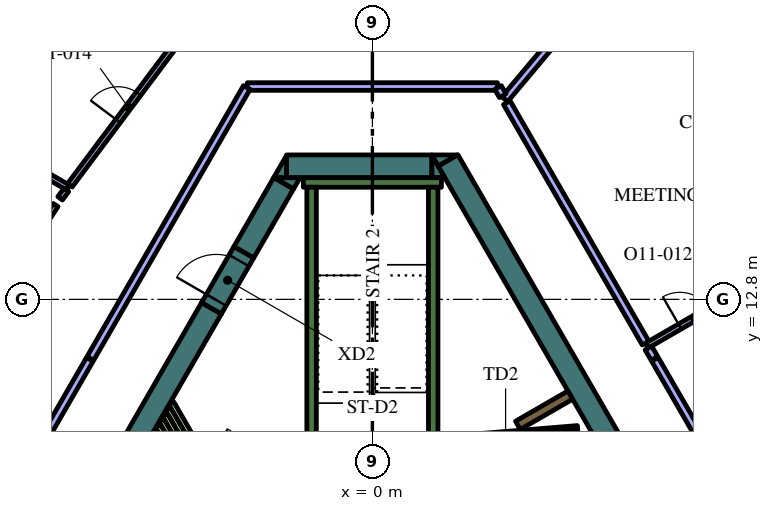
"""IFC4 building model, lengths in metres.
Left out: names, types, materials, properties, quantities, classifications, styles, units other than length and angle.
Written with IfcOpenShell. Run it as: python <this file> out.ifc"""

import sys

from ifc_helpers import new_model, si_unit, direction, frame, frame_2d, origin, place, context, subcontext, project, spatial, polyline, rectangle, outline, extrude, element, fill, save


model = new_model("IFC4")
c1 = context("Model", 3, precision=1e-05, world=origin(), true_north=direction((0.0, 1.0)))
c2 = subcontext(c1, "Body", "Model", "MODEL_VIEW")
j1 = project(units=[si_unit("LENGTHUNIT", "METRE"), si_unit("PLANEANGLEUNIT", "RADIAN")], contexts=[c1])
p1 = place(None, origin())
s1 = spatial("IfcSite", under=j1, at=p1, CompositionType="ELEMENT")
p2 = place(p1, origin())
s2 = spatial("IfcBuilding", under=s1, at=p2, CompositionType="ELEMENT")
p3 = place(p2, frame((0.0, 0.0, 271.2)))
s3 = spatial("IfcBuildingStorey", under=s2, at=p3, CompositionType="ELEMENT", Elevation=271.2)
p4 = place(p3, frame((1.989, 16.456, 0.0), z_axis=(0.0, 0.0, 1.0), x_axis=(0.49999102663, -0.8660305845, 0.0)))
e1 = element("IfcWall", 1, at=p4, inside=s3, PredefinedType="SOLIDWALL", context=c2, shape_type="SweptSolid", body=[
    extrude(rectangle(XDim=12.406, YDim=0.6, at=frame_2d((6.203, 0.0))), origin(), (0.0, 0.0, 1.0), 4.2),
])
p5 = place(p3, origin())
e2 = element("IfcWall", 2, at=p5, inside=s3, PredefinedType="SOLIDWALL", context=c2, shape_type="SweptSolid", body=[
    extrude(outline(polyline([(1.559, 16.6), (2.235, 16.6), (1.728, 16.307), (1.559, 16.6)])), origin(), (0.0, 0.0, 1.0), 4.2),
])
p6 = place(p3, frame((-2.258, 16.3, 0.0), z_axis=(0.0, 0.0, 1.0), x_axis=(1.0, 0.0, 0.0)))
e3 = element("IfcWall", 3, at=p6, inside=s3, PredefinedType="SOLIDWALL", context=c2, shape_type="SweptSolid", body=[
    extrude(rectangle(XDim=3.823, YDim=0.6, at=frame_2d((1.912, 0.0))), origin(), (0.0, 0.0, 1.0), 4.2),
])
e4 = element("IfcWall", 4, at=p5, inside=s3, PredefinedType="SOLIDWALL", context=c2, shape_type="SweptSolid", body=[
    extrude(outline(polyline([(1.905, 16.0), (1.567, 16.0), (1.567, 16.585), (1.905, 16.0)])), origin(), (0.0, 0.0, 1.0), 4.2),
])
e5 = element("IfcWall", 5, at=p5, inside=s3, PredefinedType="SOLIDWALL", context=c2, shape_type="SweptSolid", body=[
    extrude(outline(polyline([(-2.598, 16.0), (-2.26, 16.585), (-2.26, 16.0), (-2.598, 16.0)])), origin(), (0.0, 0.0, 1.0), 4.2),
])
p7 = place(p3, frame((-2.335, 15.855, 0.0), z_axis=(0.0, 0.0, 1.0), x_axis=(-0.499980971027, -0.866036389889, 0.0)))
e6 = element("IfcWall", 6, at=p7, inside=s3, PredefinedType="SOLIDWALL", context=c2, shape_type="SweptSolid", body=[
    extrude(rectangle(XDim=2.098, YDim=0.6, at=frame_2d((1.049, 0.0))), origin(), (0.0, 0.0, 1.0), 4.2),
])
e7 = element("IfcWall", 7, at=p5, inside=s3, PredefinedType="SOLIDWALL", context=c2, shape_type="SweptSolid", body=[
    extrude(outline(polyline([(-1.905, 16.0), (-2.074, 15.707), (-2.581, 16.0), (-1.905, 16.0)])), origin(), (0.0, 0.0, 1.0), 4.2),
])
p8 = place(p3, frame((-4.234, 12.566, 0.0), z_axis=(0.0, 0.0, 1.0), x_axis=(-0.499998841866, -0.866026072432, 0.0)))
e8 = element("IfcWall", 8, at=p8, inside=s3, PredefinedType="SOLIDWALL", context=c2, shape_type="SweptSolid", body=[
    extrude(rectangle(XDim=16.694, YDim=0.6, at=frame_2d((8.347, 0.0))), origin(), (0.0, 0.0, 1.0), 4.2),
])
p9 = place(p3, frame((-1.817, 15.875, 0.0), z_axis=(0.0, 0.0, 1.0), x_axis=(1.0, 0.0, 0.0)))
e9 = element("IfcWall", 9, at=p9, inside=s3, PredefinedType="SOLIDWALL", context=c2, shape_type="SweptSolid", body=[
    extrude(rectangle(XDim=3.634, YDim=0.25, at=frame_2d((1.817, 0.0))), origin(), (0.0, 0.0, 1.0), 4.2),
])
p10 = place(p3, frame((1.6, 8.95, 0.0), z_axis=(0.0, 0.0, 1.0), x_axis=(0.0, 1.0, 0.0)))
e10 = element("IfcWall", 10, at=p10, inside=s3, PredefinedType="SOLIDWALL", context=c2, shape_type="SweptSolid", body=[
    extrude(rectangle(XDim=6.8, YDim=0.25, at=frame_2d((3.4, 0.0))), origin(), (0.0, 0.0, 1.0), 4.2),
])
p11 = place(p3, frame((-1.6, 8.7, 0.0), z_axis=(0.0, 0.0, 1.0), x_axis=(0.0, 1.0, 0.0)))
e11 = element("IfcWall", 11, at=p11, inside=s3, PredefinedType="SOLIDWALL", context=c2, shape_type="SweptSolid", body=[
    extrude(rectangle(XDim=7.05, YDim=0.25, at=frame_2d((3.525, 0.0))), origin(), (0.0, 0.0, 1.0), 4.2),
])
p12 = place(p3, frame((3.83, 9.486, 0.0), z_axis=(0.0, 0.0, 1.0), x_axis=(0.865986202621, 0.500067892261, 0.0)))
e12 = element("IfcWall", 12, at=p12, inside=s3, PredefinedType="SOLIDWALL", context=c2, shape_type="SweptSolid", body=[
    extrude(rectangle(XDim=1.591, YDim=0.25, at=frame_2d((0.795, 0.0))), origin(), (0.0, 0.0, 1.0), 4.2),
])
p13 = place(p3, frame((-5.294, 10.067, 0.0), z_axis=(0.0, 0.0, 1.0), x_axis=(0.500054140411, -0.865994143547, 0.0)))
e13 = element("IfcWall", 13, at=p13, inside=s3, PredefinedType="PARTITIONING", context=c2, shape_type="SweptSolid", body=[
    extrude(rectangle(XDim=1.529, YDim=0.15, at=frame_2d((0.765, 0.0))), origin(), (0.0, 0.0, 1.0), 3.55),
])
p14 = place(p3, frame((-5.381, 9.917, 0.0), z_axis=(0.0, 0.0, 1.0), x_axis=(0.500136970483, -0.865946309396, 0.0)))
e14 = element("IfcWall", 14, at=p14, inside=s3, PredefinedType="PARTITIONING", context=c2, shape_type="SweptSolid", body=[
    extrude(rectangle(XDim=1.359, YDim=0.15, at=frame_2d((0.68, 0.0))), origin(), (0.0, 0.0, 1.0), 3.55),
])
p15 = place(p3, frame((-5.467, 9.767, 0.0), z_axis=(0.0, 0.0, 1.0), x_axis=(0.500168849293, -0.86592789665, 0.0)))
e15 = element("IfcWall", 15, at=p15, inside=s3, PredefinedType="PARTITIONING", context=c2, shape_type="SweptSolid", body=[
    extrude(rectangle(XDim=1.01, YDim=0.15, at=frame_2d((0.505, 0.0))), origin(), (0.0, 0.0, 1.0), 3.55),
])
p16 = place(p3, frame((-5.554, 9.617, 0.0), z_axis=(0.0, 0.0, 1.0), x_axis=(0.500253084543, -0.86587923604, 0.0)))
e16 = element("IfcWall", 16, at=p16, inside=s3, PredefinedType="PARTITIONING", context=c2, shape_type="SweptSolid", body=[
    extrude(rectangle(XDim=0.664, YDim=0.15, at=frame_2d((0.332, 0.0))), origin(), (0.0, 0.0, 1.0), 3.55),
])
p17 = place(p3, frame((-5.64, 9.467, 0.0), z_axis=(0.0, 0.0, 1.0), x_axis=(0.499944387978, -0.86605750902, 0.0)))
e17 = element("IfcWall", 17, at=p17, inside=s3, PredefinedType="PARTITIONING", context=c2, shape_type="SweptSolid", body=[
    extrude(rectangle(XDim=0.317, YDim=0.15, at=frame_2d((0.159, 0.0))), origin(), (0.0, 0.0, 1.0), 3.55),
])
p18 = place(p3, frame((5.398, 9.419, 0.0), z_axis=(0.0, 0.0, 1.0), x_axis=(-0.996653416376, -0.081743303248, 0.0)))
e18 = element("IfcWall", 18, at=p18, inside=s3, PredefinedType="PARTITIONING", context=c2, shape_type="SweptSolid", body=[
    extrude(rectangle(XDim=2.7, YDim=0.12, at=frame_2d((1.35, 0.0))), origin(), (0.0, 0.0, 1.0), 3.55),
])
p19 = place(p18, frame((1.45, 0.0, 0.0)))
e19 = element("IfcOpeningElement", 19, at=p19, cuts=e18, PredefinedType="OPENING", context=c2, shape_type="SweptSolid", body=[
    extrude(rectangle(XDim=0.9, YDim=2.1, at=frame_2d((0.45, 1.05))), frame((0.0, 0.07, 0.0), z_axis=(0.0, -1.0, 0.0), x_axis=(1.0, 0.0, 0.0)), (0.0, 0.0, 1.0), 0.14),
])
p20 = place(p3, frame((-4.234, 12.566, 0.0), z_axis=(0.0, 0.0, 1.0), x_axis=(0.500000056704, 0.866025371046, 0.0)))
e20 = element("IfcWall", 20, at=p20, inside=s3, PredefinedType="SOLIDWALL", context=c2, shape_type="SweptSolid", body=[
    extrude(rectangle(XDim=1.7, YDim=0.6, at=frame_2d((0.85, 0.0))), origin(), (0.0, 0.0, 1.0), 4.2),
])
p21 = place(p20, frame((0.25, 0.0, 0.0)))
e21 = element("IfcOpeningElement", 21, at=p21, cuts=e20, PredefinedType="OPENING", context=c2, shape_type="SweptSolid", body=[
    extrude(rectangle(XDim=1.2, YDim=2.1, at=frame_2d((0.6, 1.05))), frame((0.0, 0.31, 0.0), z_axis=(0.0, -1.0, 0.0), x_axis=(1.0, 0.0, 0.0)), (0.0, 0.0, 1.0), 0.62),
])
p22 = place(p3, frame((7.226, 11.585, 0.0), z_axis=(0.0, 0.0, 1.0), x_axis=(0.866021079084, 0.500007490527, 0.0)))
e22 = element("IfcWall", 22, at=p22, inside=s3, PredefinedType="PARTITIONING", context=c2, shape_type="SweptSolid", body=[
    extrude(rectangle(XDim=2.892, YDim=0.15, at=frame_2d((1.446, 0.0))), origin(), (0.0, 0.0, 1.0), 3.55),
])
p23 = place(p22, frame((1.0, 0.0, 0.0)))
e23 = element("IfcOpeningElement", 23, at=p23, cuts=e22, PredefinedType="OPENING", context=c2, shape_type="SweptSolid", body=[
    extrude(rectangle(XDim=0.9, YDim=2.1, at=frame_2d((0.45, 1.05))), frame((0.0, 0.085, 0.0), z_axis=(0.0, -1.0, 0.0), x_axis=(1.0, 0.0, 0.0)), (0.0, 0.0, 1.0), 0.17),
])
p24 = place(p3, frame((13.436, 0.829, 0.0), z_axis=(0.0, 0.0, 1.0), x_axis=(-0.49999894854, 0.866026010844, 0.0)))
e24 = element("IfcWall", 24, at=p24, inside=s3, PredefinedType="PARTITIONING", context=c2, shape_type="SweptSolid", body=[
    extrude(rectangle(XDim=12.0, YDim=0.2, at=frame_2d((6.0, 0.0))), origin(), (0.0, 0.0, 1.0), 3.55),
])
p25 = place(p24, frame((5.5, 0.0, 0.0)))
e25 = element("IfcOpeningElement", 25, at=p25, cuts=e24, PredefinedType="OPENING", context=c2, shape_type="SweptSolid", body=[
    extrude(rectangle(XDim=1.0, YDim=2.1, at=frame_2d((0.5, 1.05))), frame((0.0, 0.11, 0.0), z_axis=(0.0, -1.0, 0.0), x_axis=(1.0, 0.0, 0.0)), (0.0, 0.0, 1.0), 0.22),
])
p26 = place(p3, frame((7.421, 11.247, 0.0), z_axis=(0.0, 0.0, 1.0), x_axis=(-0.500303403544, 0.865850162789, 0.0)))
e26 = element("IfcWall", 26, at=p26, inside=s3, PredefinedType="PARTITIONING", context=c2, shape_type="SweptSolid", body=[
    extrude(rectangle(XDim=0.315, YDim=0.2, at=frame_2d((0.158, 0.0))), origin(), (0.0, 0.0, 1.0), 3.55),
])
p27 = place(p3, frame((3.483, 18.067, 0.0), z_axis=(0.0, 0.0, 1.0), x_axis=(0.642896944312, 0.765952687177, 0.0)))
e27 = element("IfcWall", 27, at=p27, inside=s3, PredefinedType="PARTITIONING", context=c2, shape_type="SweptSolid", body=[
    extrude(rectangle(XDim=2.29, YDim=0.2, at=frame_2d((1.145, 0.0))), origin(), (0.0, 0.0, 1.0), 3.55),
])
p28 = place(p3, frame((7.188, 11.65, 0.0), z_axis=(0.0, 0.0, 1.0), x_axis=(-0.499989634868, 0.866031388014, 0.0)))
e28 = element("IfcWall", 28, at=p28, inside=s3, PredefinedType="PARTITIONING", context=c2, shape_type="SweptSolid", body=[
    extrude(rectangle(XDim=7.303, YDim=0.2, at=frame_2d((3.652, 0.0))), origin(), (0.0, 0.0, 1.0), 3.55),
])
p29 = place(p3, frame((-8.007, 15.74, 0.0), z_axis=(0.0, 0.0, 1.0), x_axis=(-0.866044607523, 0.499966736674, 0.0)))
e29 = element("IfcWall", 29, at=p29, inside=s3, PredefinedType="PARTITIONING", context=c2, shape_type="SweptSolid", body=[
    extrude(rectangle(XDim=3.115, YDim=0.15, at=frame_2d((1.557, 0.0))), origin(), (0.0, 0.0, 1.0), 3.55),
])
p30 = place(p3, frame((-7.962, 15.8, 0.0), z_axis=(0.0, 0.0, 1.0), x_axis=(0.599528135832, 0.800353680785, 0.0)))
e30 = element("IfcWall", 30, at=p30, inside=s3, PredefinedType="PARTITIONING", context=c2, shape_type="SweptSolid", body=[
    extrude(rectangle(XDim=5.217, YDim=0.15, at=frame_2d((2.608, 0.0))), origin(), (0.0, 0.0, 1.0), 3.55),
])
p31 = place(p30, frame((2.116, 0.0, 0.0)))
e31 = element("IfcOpeningElement", 31, at=p31, cuts=e30, PredefinedType="OPENING", context=c2, shape_type="SweptSolid", body=[
    extrude(rectangle(XDim=0.9, YDim=2.1, at=frame_2d((0.45, 1.05))), frame((0.0, 0.085, 0.0), z_axis=(0.0, -1.0, 0.0), x_axis=(1.0, 0.0, 0.0)), (0.0, 0.0, 1.0), 0.17),
])
p32 = place(p3, frame((-8.052, 15.679, 0.0), z_axis=(0.0, 0.0, 1.0), x_axis=(-0.599004157744, -0.800745914136, 0.0)))
e32 = element("IfcWall", 32, at=p32, inside=s3, PredefinedType="PARTITIONING", context=c2, shape_type="SweptSolid", body=[
    extrude(rectangle(XDim=0.275, YDim=0.15, at=frame_2d((0.137, 0.0))), origin(), (0.0, 0.0, 1.0), 3.55),
])
p33 = place(p3, frame((-11.628, 10.29, 0.0), z_axis=(0.0, 0.0, 1.0), x_axis=(0.55074607557, 0.834672846236, 0.0)))
e33 = element("IfcWall", 33, at=p33, inside=s3, PredefinedType="PARTITIONING", context=c2, shape_type="SweptSolid", body=[
    extrude(rectangle(XDim=5.979, YDim=0.15, at=frame_2d((2.99, 0.0))), origin(), (0.0, 0.0, 1.0), 3.55),
])
p34 = place(p33, frame((2.58, 0.0, 0.0)))
e34 = element("IfcOpeningElement", 34, at=p34, cuts=e33, PredefinedType="OPENING", context=c2, shape_type="SweptSolid", body=[
    extrude(rectangle(XDim=0.9, YDim=2.1, at=frame_2d((0.45, 1.05))), frame((0.0, 0.085, 0.0), z_axis=(0.0, -1.0, 0.0), x_axis=(1.0, 0.0, 0.0)), (0.0, 0.0, 1.0), 0.17),
])
p35 = place(p3, frame((-7.436, 11.221, 0.0), z_axis=(0.0, 0.0, 1.0), x_axis=(-0.49999894854, -0.866026010844, 0.0)))
e35 = element("IfcWall", 35, at=p35, inside=s3, PredefinedType="PARTITIONING", context=c2, shape_type="SweptSolid", body=[
    extrude(rectangle(XDim=12.0, YDim=0.2, at=frame_2d((6.0, 0.0))), origin(), (0.0, 0.0, 1.0), 3.55),
])
p36 = place(p35, frame((5.5, 0.0, 0.0)))
e36 = element("IfcOpeningElement", 36, at=p36, cuts=e35, PredefinedType="OPENING", context=c2, shape_type="SweptSolid", body=[
    extrude(rectangle(XDim=1.0, YDim=2.1, at=frame_2d((0.5, 1.05))), frame((0.0, 0.11, 0.0), z_axis=(0.0, -1.0, 0.0), x_axis=(1.0, 0.0, 0.0)), (0.0, 0.0, 1.0), 0.22),
])
p37 = place(p3, frame((3.291, 18.4, 0.0), z_axis=(0.0, 0.0, 1.0), x_axis=(-1.0, 0.0, 0.0)))
e37 = element("IfcWall", 37, at=p37, inside=s3, PredefinedType="PARTITIONING", context=c2, shape_type="SweptSolid", body=[
    extrude(rectangle(XDim=6.582, YDim=0.2, at=frame_2d((3.291, 0.0))), origin(), (0.0, 0.0, 1.0), 3.55),
])
p38 = place(p3, frame((-3.306, 18.374, 0.0), z_axis=(0.0, 0.0, 1.0), x_axis=(-0.499999798456, -0.866025520146, 0.0)))
e38 = element("IfcWall", 38, at=p38, inside=s3, PredefinedType="PARTITIONING", context=c2, shape_type="SweptSolid", body=[
    extrude(rectangle(XDim=8.229, YDim=0.2, at=frame_2d((4.115, 0.0))), origin(), (0.0, 0.0, 1.0), 3.55),
])
p39 = place(p3, frame((3.43, 18.159, 0.0), z_axis=(0.0, 0.0, 1.0), x_axis=(-0.499949632511, 0.866054481515, 0.0)))
e39 = element("IfcWall", 39, at=p39, inside=s3, PredefinedType="PARTITIONING", context=c2, shape_type="SweptSolid", body=[
    extrude(rectangle(XDim=0.248, YDim=0.2, at=frame_2d((0.124, 0.0))), origin(), (0.0, 0.0, 1.0), 3.55),
])
p40 = place(p3, frame((10.938, 17.99, 0.0), z_axis=(0.0, 0.0, 1.0), x_axis=(-0.599559865294, 0.800329911929, 0.0)))
e40 = element("IfcWall", 40, at=p40, inside=s3, PredefinedType="SOLIDWALL", context=c2, shape_type="SweptSolid", body=[
    extrude(rectangle(XDim=5.415, YDim=0.19, at=frame_2d((2.708, 0.0))), origin(), (0.0, 0.0, 1.0), 3.95),
])
p41 = place(p40, frame((0.358, 0.0, 0.6)))
e41 = element("IfcOpeningElement", 41, at=p41, cuts=e40, PredefinedType="OPENING", context=c2, shape_type="SweptSolid", body=[
    extrude(rectangle(XDim=1.5, YDim=2.85, at=frame_2d((0.75, 1.425))), frame((0.0, 0.105, 0.0), z_axis=(0.0, -1.0, 0.0), x_axis=(1.0, 0.0, 0.0)), (0.0, 0.0, 1.0), 0.21),
])
p42 = place(p40, frame((3.593, 0.0, 0.6)))
e42 = element("IfcOpeningElement", 42, at=p42, cuts=e40, PredefinedType="OPENING", context=c2, shape_type="SweptSolid", body=[
    extrude(rectangle(XDim=1.5, YDim=2.85, at=frame_2d((0.75, 1.425))), frame((0.0, 0.105, 0.0), z_axis=(0.0, -1.0, 0.0), x_axis=(1.0, 0.0, 0.0)), (0.0, 0.0, 1.0), 0.21),
])
p43 = place(p3, frame((-7.692, 22.324, 0.0), z_axis=(0.0, 0.0, 1.0), x_axis=(-0.599559865294, -0.800329911929, 0.0)))
e43 = element("IfcWall", 43, at=p43, inside=s3, PredefinedType="SOLIDWALL", context=c2, shape_type="SweptSolid", body=[
    extrude(rectangle(XDim=5.415, YDim=0.19, at=frame_2d((2.708, 0.0))), origin(), (0.0, 0.0, 1.0), 3.95),
])
p44 = place(p43, frame((0.323, 0.0, 0.6)))
e44 = element("IfcOpeningElement", 44, at=p44, cuts=e43, PredefinedType="OPENING", context=c2, shape_type="SweptSolid", body=[
    extrude(rectangle(XDim=1.5, YDim=2.85, at=frame_2d((0.75, 1.425))), frame((0.0, 0.105, 0.0), z_axis=(0.0, -1.0, 0.0), x_axis=(1.0, 0.0, 0.0)), (0.0, 0.0, 1.0), 0.21),
])
p45 = place(p43, frame((3.558, 0.0, 0.6)))
e45 = element("IfcOpeningElement", 45, at=p45, cuts=e43, PredefinedType="OPENING", context=c2, shape_type="SweptSolid", body=[
    extrude(rectangle(XDim=1.5, YDim=2.85, at=frame_2d((0.75, 1.425))), frame((0.0, 0.105, 0.0), z_axis=(0.0, -1.0, 0.0), x_axis=(1.0, 0.0, 0.0)), (0.0, 0.0, 1.0), 0.21),
])
p46 = place(p19, origin())
e46 = element("IfcDoor", 46, at=p46, inside=s3, OperationType="SINGLE_SWING_LEFT", PredefinedType="DOOR", context=c2, shape_type="SweptSolid", body=[
    extrude(rectangle(XDim=0.9, YDim=2.1, at=frame_2d((0.45, 1.05))), frame((0.0, 0.025, 0.0), z_axis=(0.0, -1.0, 0.0), x_axis=(1.0, 0.0, 0.0)), (0.0, 0.0, 1.0), 0.05),
])
fill(e19, e46)
p47 = place(p21, origin())
e47 = element("IfcDoor", 47, at=p47, inside=s3, OperationType="SINGLE_SWING_LEFT", PredefinedType="DOOR", context=c2, shape_type="SweptSolid", body=[
    extrude(rectangle(XDim=1.2, YDim=2.1, at=frame_2d((0.6, 1.05))), frame((0.0, 0.025, 0.0), z_axis=(0.0, -1.0, 0.0), x_axis=(1.0, 0.0, 0.0)), (0.0, 0.0, 1.0), 0.05),
])
fill(e21, e47)
p48 = place(p23, origin())
e48 = element("IfcDoor", 48, at=p48, inside=s3, OperationType="SINGLE_SWING_RIGHT", PredefinedType="DOOR", context=c2, shape_type="SweptSolid", body=[
    extrude(rectangle(XDim=0.9, YDim=2.1, at=frame_2d((0.45, 1.05))), frame((0.0, 0.025, 0.0), z_axis=(0.0, -1.0, 0.0), x_axis=(1.0, 0.0, 0.0)), (0.0, 0.0, 1.0), 0.05),
])
fill(e23, e48)
p49 = place(p31, origin())
e49 = element("IfcDoor", 49, at=p49, inside=s3, OperationType="SINGLE_SWING_LEFT", PredefinedType="DOOR", context=c2, shape_type="SweptSolid", body=[
    extrude(rectangle(XDim=0.9, YDim=2.1, at=frame_2d((0.45, 1.05))), frame((0.0, 0.025, 0.0), z_axis=(0.0, -1.0, 0.0), x_axis=(1.0, 0.0, 0.0)), (0.0, 0.0, 1.0), 0.05),
])
fill(e31, e49)
save(model, sys.argv[1])
